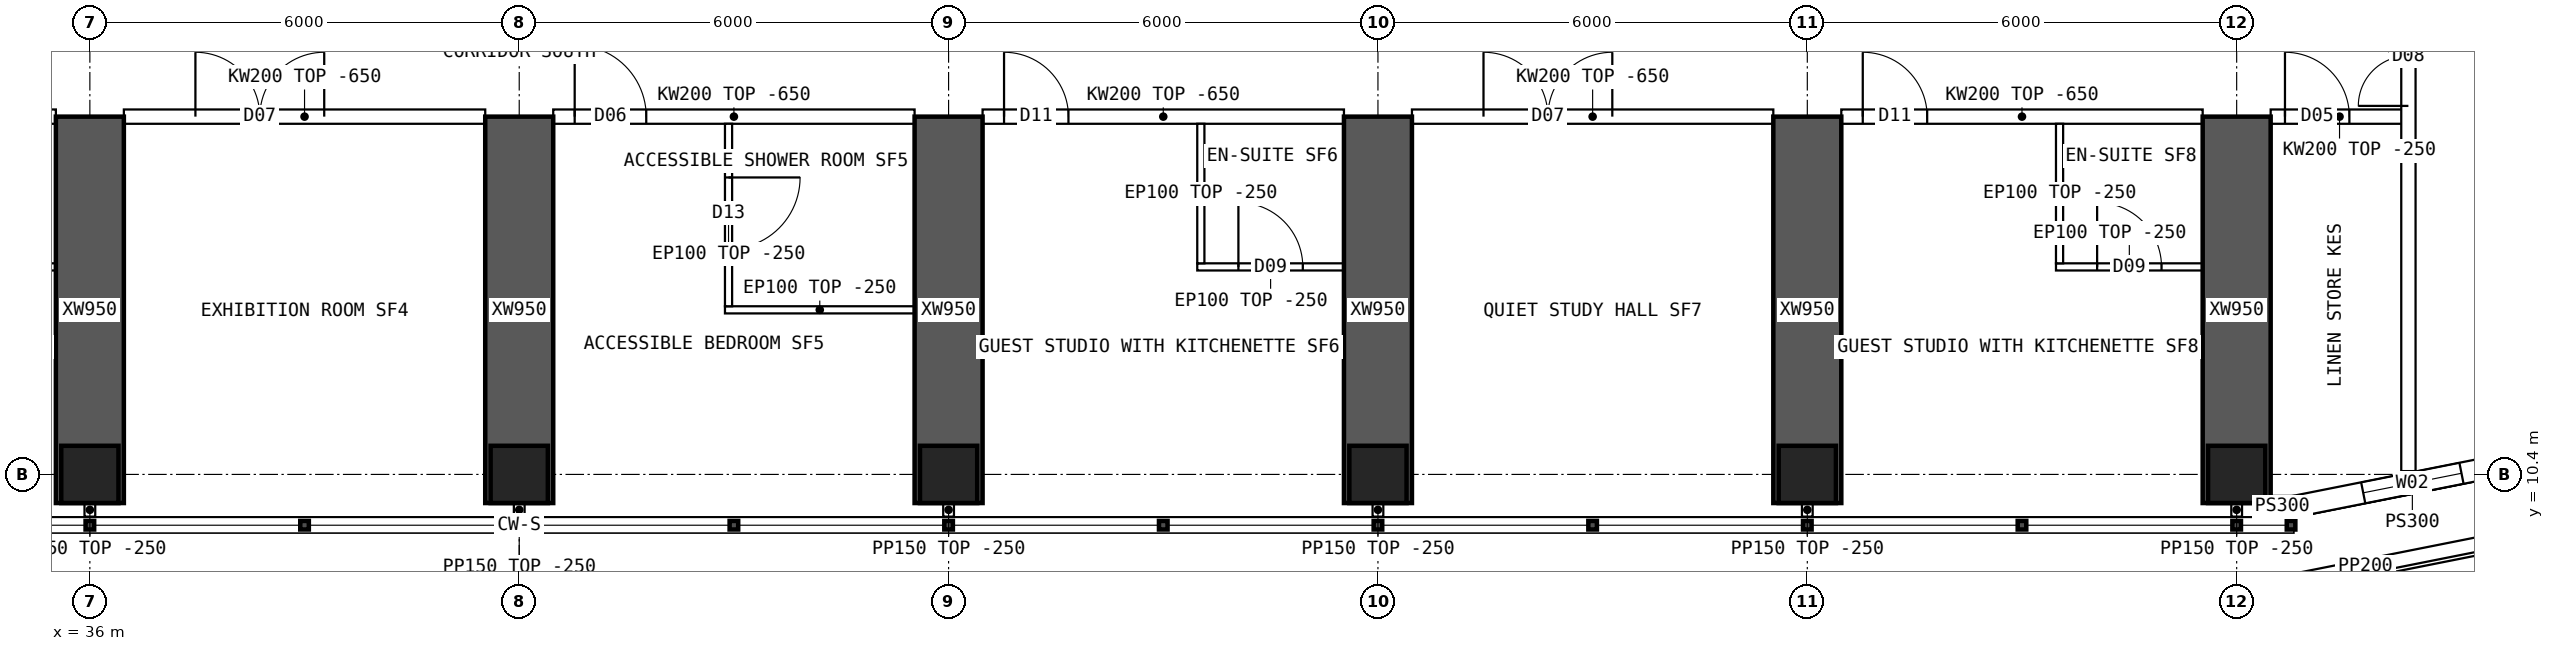
"""IFC4 building model, lengths in metres.
Left out: names, types, materials, properties, quantities, classifications, styles, units other than length and angle.
Written with IfcOpenShell. Run it as: python <this file> out.ifc"""

import sys

from ifc_helpers import new_model, si_unit, direction, frame, frame_2d, origin, origin_2d, place, context, subcontext, project, spatial, polyline, rectangle, hollow_rectangle, outline, extrude, element, fill, save


model = new_model("IFC4")
c1 = context("Model", 3, precision=1e-05, world=origin(), true_north=direction((0.0, 1.0)))
c2 = subcontext(c1, "Body", "Model", "MODEL_VIEW")
j1 = project(units=[si_unit("LENGTHUNIT", "METRE"), si_unit("PLANEANGLEUNIT", "RADIAN")], contexts=[c1])
p1 = place(None, origin())
s1 = spatial("IfcSite", under=j1, at=p1, CompositionType="ELEMENT")
p2 = place(p1, origin())
s2 = spatial("IfcBuilding", under=s1, at=p2, CompositionType="ELEMENT")
p3 = place(p2, frame((0.0, 0.0, 140.35)))
s3 = spatial("IfcBuildingStorey", under=s2, at=p3, CompositionType="ELEMENT", Elevation=140.35)
for number, where, z_axis, x_axis in (
    (1, (36.0, 10.4, 0.0), (0.0, 0.0, 1.0), (1.0, 0.0, 0.0)),
    (2, (42.0, 10.4, 0.0), (0.0, 0.0, 1.0), (1.0, 0.0, 0.0)),
    (3, (48.0, 10.4, 0.0), (0.0, 0.0, 1.0), (1.0, 0.0, 0.0)),
    (4, (54.0, 10.4, 0.0), (0.0, 0.0, 1.0), (1.0, 0.0, 0.0)),
    (5, (60.0, 10.4, 0.0), (0.0, 0.0, 1.0), (1.0, 0.0, 0.0)),
    (6, (66.0, 10.4, 0.0), (0.0, 0.0, 1.0), (1.0, 0.0, 0.0)),
):
    element("IfcColumn", number, at=place(p3, frame(where, z_axis=z_axis, x_axis=x_axis)), inside=s3, PredefinedType="COLUMN", context=c2, shape_type="SweptSolid", body=[
        extrude(hollow_rectangle(XDim=0.8, YDim=0.8, WallThickness=0.08, at=origin_2d()), origin(), (0.0, 0.0, 1.0), 4.5),
    ])
for number, where, z_axis, x_axis in (
    (7, (36.0, 10.0, 0.0), (0.0, 0.0, 1.0), (0.0, 1.0, 0.0)),
    (8, (42.0, 10.0, 0.0), (0.0, 0.0, 1.0), (0.0, 1.0, 0.0)),
    (9, (48.0, 10.0, 0.0), (0.0, 0.0, 1.0), (0.0, 1.0, 0.0)),
    (10, (54.0, 10.0, 0.0), (0.0, 0.0, 1.0), (0.0, 1.0, 0.0)),
    (11, (60.0, 10.0, 0.0), (0.0, 0.0, 1.0), (0.0, 1.0, 0.0)),
    (12, (66.0, 10.0, 0.0), (0.0, 0.0, 1.0), (0.0, 1.0, 0.0)),
):
    element("IfcWall", number, at=place(p3, frame(where, z_axis=z_axis, x_axis=x_axis)), inside=s3, PredefinedType="SHEAR", context=c2, shape_type="SweptSolid", body=[
        extrude(rectangle(XDim=5.4, YDim=0.95, at=frame_2d((2.7, 0.0))), origin(), (0.0, 0.0, 1.0), 4.5),
    ])
p4 = place(p3, frame((66.8, 9.95, 0.0), z_axis=(0.0, 0.0, 1.0), x_axis=(0.98078325777, 0.195100490205, 0.0)))
e13 = element("IfcWall", 13, at=p4, inside=s3, PredefinedType="SOLIDWALL", context=c2, shape_type="SweptSolid", body=[
    extrude(outline(polyline([(-0.03, -0.15), (3.405, -0.15), (3.345, 0.15), (0.03, 0.15), (-0.03, -0.15)])), origin(), (0.0, 0.0, 1.0), 4.25),
])
p5 = place(p4, frame((0.988, 0.0, 0.9)))
e14 = element("IfcOpeningElement", 14, at=p5, cuts=e13, PredefinedType="OPENING", context=c2, shape_type="SweptSolid", body=[
    extrude(rectangle(XDim=1.4, YDim=1.8, at=frame_2d((0.7, 0.9))), frame((0.0, 0.16, 0.0), z_axis=(0.0, -1.0, 0.0), x_axis=(1.0, 0.0, 0.0)), (0.0, 0.0, 1.0), 0.32),
])
p6 = place(p3, frame((66.8, 9.95, 0.0), z_axis=(0.0, 0.0, 1.0), x_axis=(-1.0, 0.0, 0.0)))
e15 = element("IfcWall", 15, at=p6, inside=s3, PredefinedType="SOLIDWALL", context=c2, shape_type="SweptSolid", body=[
    extrude(rectangle(XDim=0.325, YDim=0.3, at=frame_2d((0.163, 0.0))), origin(), (0.0, 0.0, 1.0), 4.25),
])
p7 = place(p3, frame((69.615, 9.472, 0.0), z_axis=(0.0, 0.0, 1.0), x_axis=(-0.980780584923, -0.195113926303, 0.0)))
e16 = element("IfcWall", 16, at=p7, inside=s3, PredefinedType="PARAPET", context=c2, shape_type="SweptSolid", body=[
    extrude(rectangle(XDim=3.701, YDim=0.2, at=frame_2d((1.851, 0.0))), origin(), (0.0, 0.0, 1.0), 1.1),
])
p8 = place(p3, frame((30.475, 15.4, 0.0), z_axis=(0.0, 0.0, 1.0), x_axis=(1.0, 0.0, 0.0)))
e17 = element("IfcWall", 17, at=p8, inside=s3, PredefinedType="SOLIDWALL", context=c2, shape_type="SweptSolid", body=[
    extrude(outline(polyline([(0.0, 0.0), (5.05, 0.0), (5.05, 3.85), (0.0, 3.85), (0.0, 0.0)])), frame((0.0, 0.1, 0.0), z_axis=(0.0, -1.0, 0.0), x_axis=(1.0, 0.0, 0.0)), (0.0, 0.0, 1.0), 0.2),
])
p9 = place(p8, frame((0.3, 0.0, 0.0)))
e18 = element("IfcOpeningElement", 18, at=p9, cuts=e17, PredefinedType="OPENING", context=c2, shape_type="SweptSolid", body=[
    extrude(rectangle(XDim=0.9, YDim=2.1, at=frame_2d((0.45, 1.05))), frame((0.0, 0.11, 0.0), z_axis=(0.0, -1.0, 0.0), x_axis=(1.0, 0.0, 0.0)), (0.0, 0.0, 1.0), 0.22),
])
p10 = place(p3, frame((36.475, 15.4, 0.0), z_axis=(0.0, 0.0, 1.0), x_axis=(1.0, 0.0, 0.0)))
e19 = element("IfcWall", 19, at=p10, inside=s3, PredefinedType="SOLIDWALL", context=c2, shape_type="SweptSolid", body=[
    extrude(outline(polyline([(0.0, 0.0), (5.05, 0.0), (5.05, 3.85), (0.0, 3.85), (0.0, 0.0)])), frame((0.0, 0.1, 0.0), z_axis=(0.0, -1.0, 0.0), x_axis=(1.0, 0.0, 0.0)), (0.0, 0.0, 1.0), 0.2),
])
p11 = place(p10, frame((1.0, 0.0, 0.0)))
e20 = element("IfcOpeningElement", 20, at=p11, cuts=e19, PredefinedType="OPENING", context=c2, shape_type="SweptSolid", body=[
    extrude(rectangle(XDim=1.8, YDim=2.1, at=frame_2d((0.9, 1.05))), frame((0.0, 0.11, 0.0), z_axis=(0.0, -1.0, 0.0), x_axis=(1.0, 0.0, 0.0)), (0.0, 0.0, 1.0), 0.22),
])
p12 = place(p3, frame((42.475, 15.4, 0.0), z_axis=(0.0, 0.0, 1.0), x_axis=(1.0, 0.0, 0.0)))
e21 = element("IfcWall", 21, at=p12, inside=s3, PredefinedType="SOLIDWALL", context=c2, shape_type="SweptSolid", body=[
    extrude(outline(polyline([(0.0, 0.0), (5.05, 0.0), (5.05, 3.85), (0.0, 3.85), (0.0, 0.0)])), frame((0.0, 0.1, 0.0), z_axis=(0.0, -1.0, 0.0), x_axis=(1.0, 0.0, 0.0)), (0.0, 0.0, 1.0), 0.2),
])
p13 = place(p12, frame((0.3, 0.0, 0.0)))
e22 = element("IfcOpeningElement", 22, at=p13, cuts=e21, PredefinedType="OPENING", context=c2, shape_type="SweptSolid", body=[
    extrude(rectangle(XDim=1.0, YDim=2.1, at=frame_2d((0.5, 1.05))), frame((0.0, 0.11, 0.0), z_axis=(0.0, -1.0, 0.0), x_axis=(1.0, 0.0, 0.0)), (0.0, 0.0, 1.0), 0.22),
])
p14 = place(p3, frame((48.475, 15.4, 0.0), z_axis=(0.0, 0.0, 1.0), x_axis=(1.0, 0.0, 0.0)))
e23 = element("IfcWall", 23, at=p14, inside=s3, PredefinedType="SOLIDWALL", context=c2, shape_type="SweptSolid", body=[
    extrude(outline(polyline([(0.0, 0.0), (5.05, 0.0), (5.05, 3.85), (0.0, 3.85), (0.0, 0.0)])), frame((0.0, 0.1, 0.0), z_axis=(0.0, -1.0, 0.0), x_axis=(1.0, 0.0, 0.0)), (0.0, 0.0, 1.0), 0.2),
])
p15 = place(p14, frame((0.3, 0.0, 0.0)))
e24 = element("IfcOpeningElement", 24, at=p15, cuts=e23, PredefinedType="OPENING", context=c2, shape_type="SweptSolid", body=[
    extrude(rectangle(XDim=0.9, YDim=2.1, at=frame_2d((0.45, 1.05))), frame((0.0, 0.11, 0.0), z_axis=(0.0, -1.0, 0.0), x_axis=(1.0, 0.0, 0.0)), (0.0, 0.0, 1.0), 0.22),
])
p16 = place(p3, frame((54.475, 15.4, 0.0), z_axis=(0.0, 0.0, 1.0), x_axis=(1.0, 0.0, 0.0)))
e25 = element("IfcWall", 25, at=p16, inside=s3, PredefinedType="SOLIDWALL", context=c2, shape_type="SweptSolid", body=[
    extrude(outline(polyline([(0.0, 0.0), (5.05, 0.0), (5.05, 3.85), (0.0, 3.85), (0.0, 0.0)])), frame((0.0, 0.1, 0.0), z_axis=(0.0, -1.0, 0.0), x_axis=(1.0, 0.0, 0.0)), (0.0, 0.0, 1.0), 0.2),
])
p17 = place(p16, frame((1.0, 0.0, 0.0)))
e26 = element("IfcOpeningElement", 26, at=p17, cuts=e25, PredefinedType="OPENING", context=c2, shape_type="SweptSolid", body=[
    extrude(rectangle(XDim=1.8, YDim=2.1, at=frame_2d((0.9, 1.05))), frame((0.0, 0.11, 0.0), z_axis=(0.0, -1.0, 0.0), x_axis=(1.0, 0.0, 0.0)), (0.0, 0.0, 1.0), 0.22),
])
p18 = place(p3, frame((60.475, 15.4, 0.0), z_axis=(0.0, 0.0, 1.0), x_axis=(1.0, 0.0, 0.0)))
e27 = element("IfcWall", 27, at=p18, inside=s3, PredefinedType="SOLIDWALL", context=c2, shape_type="SweptSolid", body=[
    extrude(outline(polyline([(0.0, 0.0), (5.05, 0.0), (5.05, 3.85), (0.0, 3.85), (0.0, 0.0)])), frame((0.0, 0.1, 0.0), z_axis=(0.0, -1.0, 0.0), x_axis=(1.0, 0.0, 0.0)), (0.0, 0.0, 1.0), 0.2),
])
p19 = place(p18, frame((0.3, 0.0, 0.0)))
e28 = element("IfcOpeningElement", 28, at=p19, cuts=e27, PredefinedType="OPENING", context=c2, shape_type="SweptSolid", body=[
    extrude(rectangle(XDim=0.9, YDim=2.1, at=frame_2d((0.45, 1.05))), frame((0.0, 0.11, 0.0), z_axis=(0.0, -1.0, 0.0), x_axis=(1.0, 0.0, 0.0)), (0.0, 0.0, 1.0), 0.22),
])
p20 = place(p3, frame((66.475, 15.4, 0.0), z_axis=(0.0, 0.0, 1.0), x_axis=(1.0, 0.0, 0.0)))
e29 = element("IfcWall", 29, at=p20, inside=s3, PredefinedType="SOLIDWALL", context=c2, shape_type="SweptSolid", body=[
    extrude(rectangle(XDim=1.925, YDim=0.2, at=frame_2d((0.962, 0.0))), origin(), (0.0, 0.0, 1.0), 4.25),
])
p21 = place(p20, frame((0.2, 0.0, 0.0)))
e30 = element("IfcOpeningElement", 30, at=p21, cuts=e29, PredefinedType="OPENING", context=c2, shape_type="SweptSolid", body=[
    extrude(rectangle(XDim=0.9, YDim=2.1, at=frame_2d((0.45, 1.05))), frame((0.0, 0.11, 0.0), z_axis=(0.0, -1.0, 0.0), x_axis=(1.0, 0.0, 0.0)), (0.0, 0.0, 1.0), 0.22),
])
p22 = place(p3, frame((35.525, 13.3, 0.0), z_axis=(0.0, 0.0, 1.0), x_axis=(-1.0, 0.0, 0.0)))
e31 = element("IfcWall", 31, at=p22, inside=s3, PredefinedType="PARTITIONING", context=c2, shape_type="SweptSolid", body=[
    extrude(rectangle(XDim=2.05, YDim=0.1, at=frame_2d((1.025, 0.0))), origin(), (0.0, 0.0, 1.0), 4.25),
])
p23 = place(p22, frame((0.575, 0.0, 0.0)))
e32 = element("IfcOpeningElement", 32, at=p23, cuts=e31, PredefinedType="OPENING", context=c2, shape_type="SweptSolid", body=[
    extrude(rectangle(XDim=0.9, YDim=2.1, at=frame_2d((0.45, 1.05))), frame((0.0, 0.06, 0.0), z_axis=(0.0, -1.0, 0.0), x_axis=(1.0, 0.0, 0.0)), (0.0, 0.0, 1.0), 0.12),
])
p24 = place(p3, frame((44.875, 12.7, 0.0), z_axis=(0.0, 0.0, 1.0), x_axis=(1.0, 0.0, 0.0)))
e33 = element("IfcWall", 33, at=p24, inside=s3, PredefinedType="PARTITIONING", context=c2, shape_type="SweptSolid", body=[
    extrude(rectangle(XDim=2.65, YDim=0.1, at=frame_2d((1.325, 0.0))), origin(), (0.0, 0.0, 1.0), 4.25),
])
p25 = place(p3, frame((44.925, 12.75, 0.0), z_axis=(0.0, 0.0, 1.0), x_axis=(0.0, 1.0, 0.0)))
e34 = element("IfcWall", 34, at=p25, inside=s3, PredefinedType="PARTITIONING", context=c2, shape_type="SweptSolid", body=[
    extrude(outline(polyline([(0.0, 0.0), (2.55, 0.0), (2.55, 3.85), (2.502, 3.85), (2.5, 4.25), (0.0, 4.25), (0.0, 0.0)])), frame((0.0, 0.05, 0.0), z_axis=(0.0, -1.0, 0.0), x_axis=(1.0, 0.0, 0.0)), (0.0, 0.0, 1.0), 0.1),
])
p26 = place(p25, frame((0.8, 0.0, 0.0)))
e35 = element("IfcOpeningElement", 35, at=p26, cuts=e34, PredefinedType="OPENING", context=c2, shape_type="SweptSolid", body=[
    extrude(rectangle(XDim=1.0, YDim=2.1, at=frame_2d((0.5, 1.05))), frame((0.0, 0.06, 0.0), z_axis=(0.0, -1.0, 0.0), x_axis=(1.0, 0.0, 0.0)), (0.0, 0.0, 1.0), 0.12),
])
p27 = place(p3, frame((53.525, 13.3, 0.0), z_axis=(0.0, 0.0, 1.0), x_axis=(-1.0, 0.0, 0.0)))
e36 = element("IfcWall", 36, at=p27, inside=s3, PredefinedType="PARTITIONING", context=c2, shape_type="SweptSolid", body=[
    extrude(rectangle(XDim=2.05, YDim=0.1, at=frame_2d((1.025, 0.0))), origin(), (0.0, 0.0, 1.0), 4.25),
])
p28 = place(p27, frame((0.575, 0.0, 0.0)))
e37 = element("IfcOpeningElement", 37, at=p28, cuts=e36, PredefinedType="OPENING", context=c2, shape_type="SweptSolid", body=[
    extrude(rectangle(XDim=0.9, YDim=2.1, at=frame_2d((0.45, 1.05))), frame((0.0, 0.06, 0.0), z_axis=(0.0, -1.0, 0.0), x_axis=(1.0, 0.0, 0.0)), (0.0, 0.0, 1.0), 0.12),
])
p29 = place(p3, frame((51.525, 13.35, 0.0), z_axis=(0.0, 0.0, 1.0), x_axis=(0.0, 1.0, 0.0)))
e38 = element("IfcWall", 38, at=p29, inside=s3, PredefinedType="PARTITIONING", context=c2, shape_type="SweptSolid", body=[
    extrude(outline(polyline([(0.0, 0.0), (1.95, 0.0), (1.95, 3.85), (1.902, 3.85), (1.9, 4.25), (0.0, 4.25), (0.0, 0.0)])), frame((0.0, 0.05, 0.0), z_axis=(0.0, -1.0, 0.0), x_axis=(1.0, 0.0, 0.0)), (0.0, 0.0, 1.0), 0.1),
])
p30 = place(p3, frame((65.525, 13.3, 0.0), z_axis=(0.0, 0.0, 1.0), x_axis=(-1.0, 0.0, 0.0)))
e39 = element("IfcWall", 39, at=p30, inside=s3, PredefinedType="PARTITIONING", context=c2, shape_type="SweptSolid", body=[
    extrude(rectangle(XDim=2.05, YDim=0.1, at=frame_2d((1.025, 0.0))), origin(), (0.0, 0.0, 1.0), 4.25),
])
p31 = place(p30, frame((0.575, 0.0, 0.0)))
e40 = element("IfcOpeningElement", 40, at=p31, cuts=e39, PredefinedType="OPENING", context=c2, shape_type="SweptSolid", body=[
    extrude(rectangle(XDim=0.9, YDim=2.1, at=frame_2d((0.45, 1.05))), frame((0.0, 0.06, 0.0), z_axis=(0.0, -1.0, 0.0), x_axis=(1.0, 0.0, 0.0)), (0.0, 0.0, 1.0), 0.12),
])
p32 = place(p3, frame((63.525, 13.35, 0.0), z_axis=(0.0, 0.0, 1.0), x_axis=(0.0, 1.0, 0.0)))
e41 = element("IfcWall", 41, at=p32, inside=s3, PredefinedType="PARTITIONING", context=c2, shape_type="SweptSolid", body=[
    extrude(outline(polyline([(0.0, 0.0), (1.95, 0.0), (1.95, 3.85), (1.902, 3.85), (1.9, 4.25), (0.0, 4.25), (0.0, 0.0)])), frame((0.0, 0.05, 0.0), z_axis=(0.0, -1.0, 0.0), x_axis=(1.0, 0.0, 0.0)), (0.0, 0.0, 1.0), 0.1),
])
p33 = place(p3, frame((68.4, 10.446, 0.0), z_axis=(0.0, 0.0, 1.0), x_axis=(0.0, 1.0, 0.0)))
e42 = element("IfcWall", 42, at=p33, inside=s3, PredefinedType="SOLIDWALL", context=c2, shape_type="SweptSolid", body=[
    extrude(rectangle(XDim=43.107, YDim=0.2, at=frame_2d((21.554, 0.0))), origin(), (0.0, 0.0, 1.0), 4.25),
])
p34 = place(p33, frame((13.914, 0.0, 0.0)))
e43 = element("IfcOpeningElement", 43, at=p34, cuts=e42, PredefinedType="OPENING", context=c2, shape_type="SweptSolid", body=[
    extrude(rectangle(XDim=1.2, YDim=2.1, at=frame_2d((0.6, 1.05))), frame((0.0, 0.11, 0.0), z_axis=(0.0, -1.0, 0.0), x_axis=(1.0, 0.0, 0.0)), (0.0, 0.0, 1.0), 0.22),
])
p35 = place(p33, frame((27.994, 0.0, 0.0)))
e44 = element("IfcOpeningElement", 44, at=p35, cuts=e42, PredefinedType="OPENING", context=c2, shape_type="SweptSolid", body=[
    extrude(rectangle(XDim=1.2, YDim=2.1, at=frame_2d((0.6, 1.05))), frame((0.0, 0.11, 0.0), z_axis=(0.0, -1.0, 0.0), x_axis=(1.0, 0.0, 0.0)), (0.0, 0.0, 1.0), 0.22),
])
p36 = place(p33, frame((5.104, 0.0, 0.0)))
e45 = element("IfcOpeningElement", 45, at=p36, cuts=e42, PredefinedType="OPENING", context=c2, shape_type="SweptSolid", body=[
    extrude(rectangle(XDim=1.4, YDim=2.1, at=frame_2d((0.7, 1.05))), frame((0.0, 0.11, 0.0), z_axis=(0.0, -1.0, 0.0), x_axis=(1.0, 0.0, 0.0)), (0.0, 0.0, 1.0), 0.22),
])
p37 = place(p33, frame((36.504, 0.0, 0.0)))
e46 = element("IfcOpeningElement", 46, at=p37, cuts=e42, PredefinedType="OPENING", context=c2, shape_type="SweptSolid", body=[
    extrude(rectangle(XDim=1.4, YDim=2.1, at=frame_2d((0.7, 1.05))), frame((0.0, 0.11, 0.0), z_axis=(0.0, -1.0, 0.0), x_axis=(1.0, 0.0, 0.0)), (0.0, 0.0, 1.0), 0.22),
])
for number, where, z_axis, x_axis in (
    (47, (36.0, 10.0, 0.0), (0.0, 0.0, 1.0), (0.0, -1.0, 0.0)),
    (48, (42.0, 10.0, 0.0), (0.0, 0.0, 1.0), (0.0, -1.0, 0.0)),
    (49, (48.0, 10.0, 0.0), (0.0, 0.0, 1.0), (0.0, -1.0, 0.0)),
    (50, (54.0, 10.0, 0.0), (0.0, 0.0, 1.0), (0.0, -1.0, 0.0)),
    (51, (60.0, 10.0, 0.0), (0.0, 0.0, 1.0), (0.0, -1.0, 0.0)),
    (52, (66.0, 10.0, 0.0), (0.0, 0.0, 1.0), (0.0, -1.0, 0.0)),
):
    element("IfcWall", number, at=place(p3, frame(where, z_axis=z_axis, x_axis=x_axis)), inside=s3, PredefinedType="PARTITIONING", context=c2, shape_type="SweptSolid", body=[
        extrude(rectangle(XDim=0.19, YDim=0.15, at=frame_2d((0.095, 0.0))), origin(), (0.0, 0.0, 1.0), 4.25),
    ])
p38 = place(p5, origin())
e53 = element("IfcWindow", 53, at=p38, inside=s3, PartitioningType="SINGLE_PANEL", PredefinedType="WINDOW", context=c2, shape_type="SweptSolid", body=[
    extrude(rectangle(XDim=1.4, YDim=1.8, at=frame_2d((0.7, 0.9))), frame((0.0, 0.03, 0.0), z_axis=(0.0, -1.0, 0.0), x_axis=(1.0, 0.0, 0.0)), (0.0, 0.0, 1.0), 0.06),
])
fill(e14, e53)
p39 = place(p11, origin())
e54 = element("IfcDoor", 54, at=p39, inside=s3, OperationType="DOUBLE_DOOR_SINGLE_SWING", PredefinedType="DOOR", context=c2, shape_type="SweptSolid", body=[
    extrude(rectangle(XDim=1.8, YDim=2.1, at=frame_2d((0.9, 1.05))), frame((0.0, 0.025, 0.0), z_axis=(0.0, -1.0, 0.0), x_axis=(1.0, 0.0, 0.0)), (0.0, 0.0, 1.0), 0.05),
])
fill(e20, e54)
p40 = place(p26, origin())
e55 = element("IfcDoor", 55, at=p40, inside=s3, OperationType="SINGLE_SWING_RIGHT", PredefinedType="DOOR", context=c2, shape_type="SweptSolid", body=[
    extrude(rectangle(XDim=1.0, YDim=2.1, at=frame_2d((0.5, 1.05))), frame((0.0, 0.025, 0.0), z_axis=(0.0, -1.0, 0.0), x_axis=(1.0, 0.0, 0.0)), (0.0, 0.0, 1.0), 0.05),
])
fill(e35, e55)
p41 = place(p13, origin())
e56 = element("IfcDoor", 56, at=p41, inside=s3, OperationType="SINGLE_SWING_LEFT", PredefinedType="DOOR", context=c2, shape_type="SweptSolid", body=[
    extrude(rectangle(XDim=1.0, YDim=2.1, at=frame_2d((0.5, 1.05))), frame((0.0, 0.025, 0.0), z_axis=(0.0, -1.0, 0.0), x_axis=(1.0, 0.0, 0.0)), (0.0, 0.0, 1.0), 0.05),
])
fill(e22, e56)
p42 = place(p28, origin())
e57 = element("IfcDoor", 57, at=p42, inside=s3, OperationType="SINGLE_SWING_RIGHT", PredefinedType="DOOR", context=c2, shape_type="SweptSolid", body=[
    extrude(rectangle(XDim=0.9, YDim=2.1, at=frame_2d((0.45, 1.05))), frame((0.0, 0.025, 0.0), z_axis=(0.0, -1.0, 0.0), x_axis=(1.0, 0.0, 0.0)), (0.0, 0.0, 1.0), 0.05),
])
fill(e37, e57)
p43 = place(p15, origin())
e58 = element("IfcDoor", 58, at=p43, inside=s3, OperationType="SINGLE_SWING_LEFT", PredefinedType="DOOR", context=c2, shape_type="SweptSolid", body=[
    extrude(rectangle(XDim=0.9, YDim=2.1, at=frame_2d((0.45, 1.05))), frame((0.0, 0.025, 0.0), z_axis=(0.0, -1.0, 0.0), x_axis=(1.0, 0.0, 0.0)), (0.0, 0.0, 1.0), 0.05),
])
fill(e24, e58)
p44 = place(p17, origin())
e59 = element("IfcDoor", 59, at=p44, inside=s3, OperationType="DOUBLE_DOOR_SINGLE_SWING", PredefinedType="DOOR", context=c2, shape_type="SweptSolid", body=[
    extrude(rectangle(XDim=1.8, YDim=2.1, at=frame_2d((0.9, 1.05))), frame((0.0, 0.025, 0.0), z_axis=(0.0, -1.0, 0.0), x_axis=(1.0, 0.0, 0.0)), (0.0, 0.0, 1.0), 0.05),
])
fill(e26, e59)
p45 = place(p31, origin())
e60 = element("IfcDoor", 60, at=p45, inside=s3, OperationType="SINGLE_SWING_RIGHT", PredefinedType="DOOR", context=c2, shape_type="SweptSolid", body=[
    extrude(rectangle(XDim=0.9, YDim=2.1, at=frame_2d((0.45, 1.05))), frame((0.0, 0.025, 0.0), z_axis=(0.0, -1.0, 0.0), x_axis=(1.0, 0.0, 0.0)), (0.0, 0.0, 1.0), 0.05),
])
fill(e40, e60)
p46 = place(p19, origin())
e61 = element("IfcDoor", 61, at=p46, inside=s3, OperationType="SINGLE_SWING_LEFT", PredefinedType="DOOR", context=c2, shape_type="SweptSolid", body=[
    extrude(rectangle(XDim=0.9, YDim=2.1, at=frame_2d((0.45, 1.05))), frame((0.0, 0.025, 0.0), z_axis=(0.0, -1.0, 0.0), x_axis=(1.0, 0.0, 0.0)), (0.0, 0.0, 1.0), 0.05),
])
fill(e28, e61)
p47 = place(p36, origin())
e62 = element("IfcDoor", 62, at=p47, inside=s3, OperationType="DOUBLE_DOOR_SINGLE_SWING", PredefinedType="DOOR", context=c2, shape_type="SweptSolid", body=[
    extrude(rectangle(XDim=1.4, YDim=2.1, at=frame_2d((0.7, 1.05))), frame((0.0, 0.025, 0.0), z_axis=(0.0, -1.0, 0.0), x_axis=(1.0, 0.0, 0.0)), (0.0, 0.0, 1.0), 0.05),
])
fill(e45, e62)
p48 = place(p21, origin())
e63 = element("IfcDoor", 63, at=p48, inside=s3, OperationType="SINGLE_SWING_LEFT", PredefinedType="DOOR", context=c2, shape_type="SweptSolid", body=[
    extrude(rectangle(XDim=0.9, YDim=2.1, at=frame_2d((0.45, 1.05))), frame((0.0, 0.025, 0.0), z_axis=(0.0, -1.0, 0.0), x_axis=(1.0, 0.0, 0.0)), (0.0, 0.0, 1.0), 0.05),
])
fill(e30, e63)
save(model, sys.argv[1])
